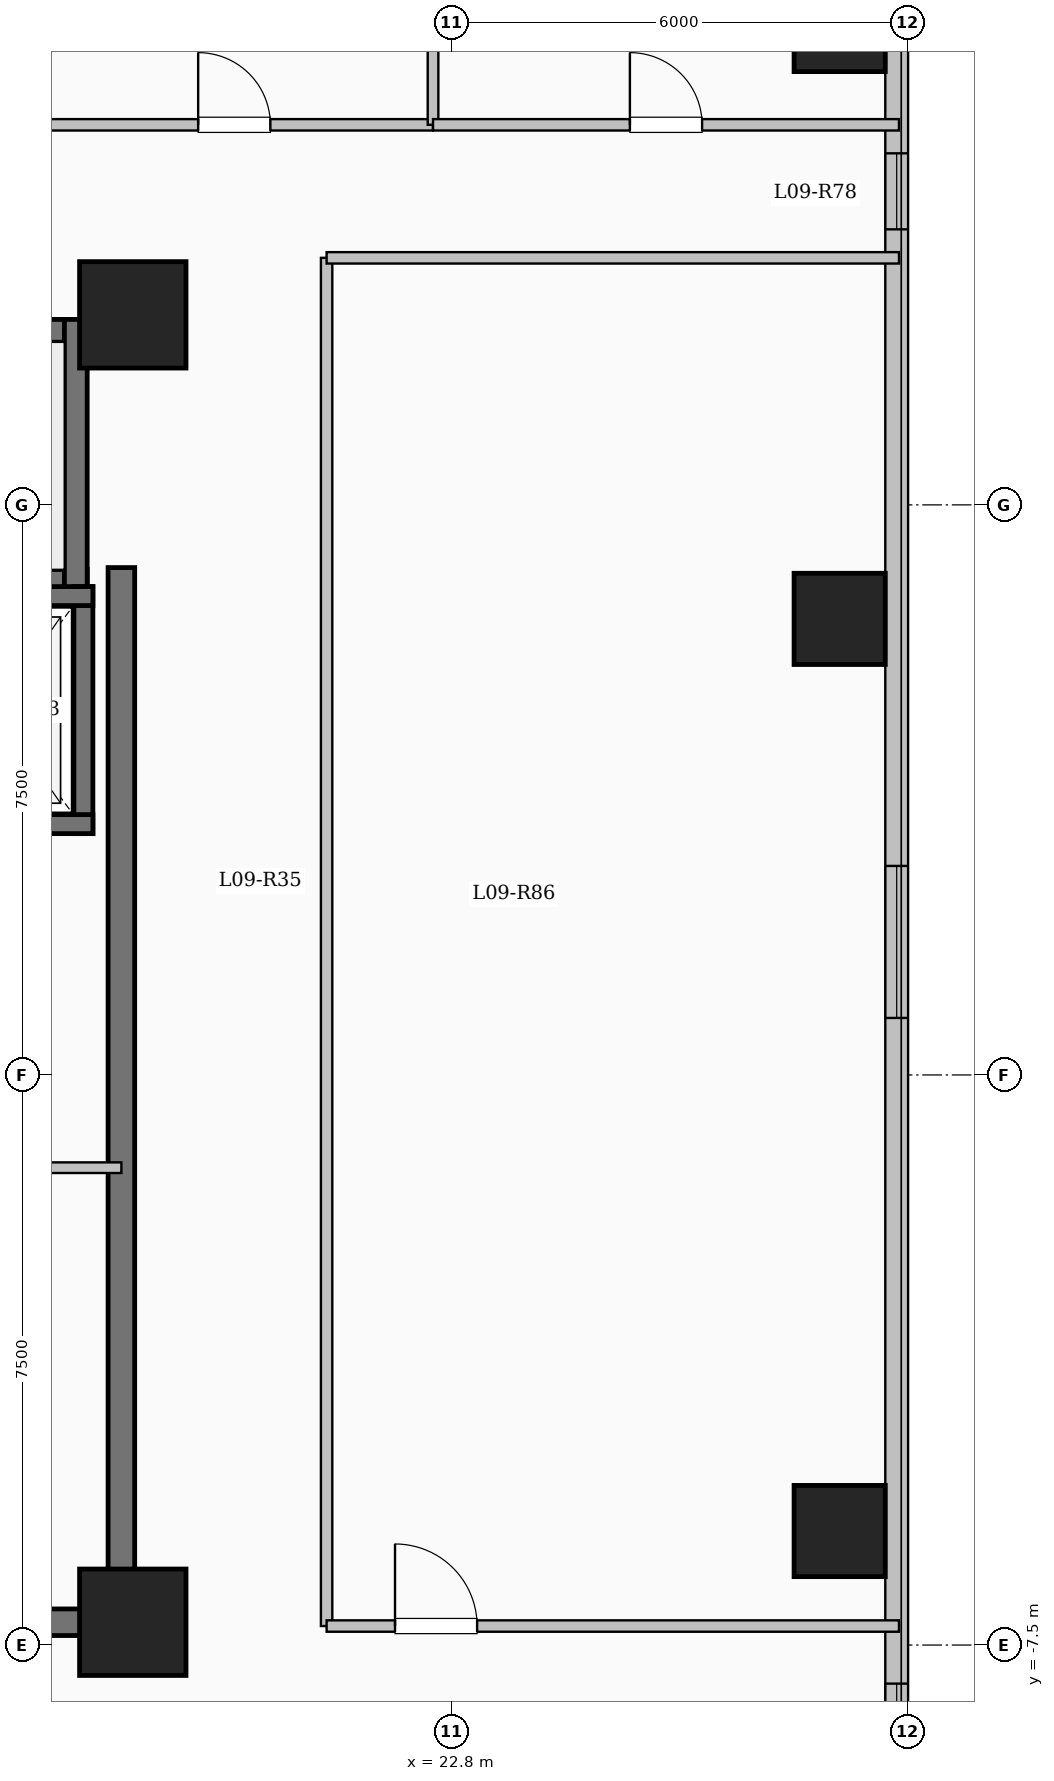
"""IFC4 building model, lengths in metres.
Left out: names, types, materials, properties, quantities, classifications, styles, units other than length and angle.
Written with IfcOpenShell. Run it as: python <this file> out.ifc"""

import sys

from ifc_helpers import new_model, si_unit, direction, frame, frame_2d, origin, origin_2d, place, context, subcontext, project, spatial, rectangle, extrude, element, fill, save


model = new_model("IFC4")
c1 = context("Model", 3, precision=1e-05, world=origin(), true_north=direction((0.0, 1.0)))
c2 = subcontext(c1, "Body", "Model", "MODEL_VIEW")
j1 = project(units=[si_unit("LENGTHUNIT", "METRE"), si_unit("PLANEANGLEUNIT", "RADIAN")], contexts=[c1])
p1 = place(None, origin())
s1 = spatial("IfcSite", under=j1, at=p1, CompositionType="ELEMENT")
p2 = place(p1, origin())
s2 = spatial("IfcBuilding", under=s1, at=p2, CompositionType="ELEMENT")
p3 = place(p2, frame((0.0, 0.0, 37.4)))
s3 = spatial("IfcBuildingStorey", under=s2, at=p3, CompositionType="ELEMENT", Elevation=37.4)
for number, where, z_axis, x_axis in (
    (1, (18.6, -7.2, 0.0), (0.0, 0.0, 1.0), (1.0, 0.0, 0.0)),
    (2, (18.6, 10.0, 0.0), (0.0, 0.0, 1.0), (1.0, 0.0, 0.0)),
):
    element("IfcColumn", number, at=place(p3, frame(where, z_axis=z_axis, x_axis=x_axis)), inside=s3, PredefinedType="COLUMN", context=c2, shape_type="SweptSolid", body=[
        extrude(rectangle(XDim=1.4, YDim=1.4, at=origin_2d()), origin(), (0.0, 0.0, 1.0), 3.35),
    ])
for number, where, z_axis, x_axis in (
    (3, (27.9, -6.0, 0.0), (0.0, 0.0, 1.0), (1.0, 0.0, 0.0)),
    (4, (27.9, 6.0, 0.0), (0.0, 0.0, 1.0), (1.0, 0.0, 0.0)),
    (5, (27.9, 13.8, 0.0), (0.0, 0.0, 1.0), (1.0, 0.0, 0.0)),
):
    element("IfcColumn", number, at=place(p3, frame(where, z_axis=z_axis, x_axis=x_axis)), inside=s3, PredefinedType="COLUMN", context=c2, shape_type="SweptSolid", body=[
        extrude(rectangle(XDim=1.2, YDim=1.2, at=origin_2d()), origin(), (0.0, 0.0, 1.0), 3.35),
    ])
p4 = place(p3, frame((28.65, 19.05, 0.0), z_axis=(0.0, 0.0, 1.0), x_axis=(0.0, -1.0, 0.0)))
e6 = element("IfcWall", 6, at=p4, inside=s3, PredefinedType="SOLIDWALL", context=c2, shape_type="SweptSolid", body=[
    extrude(rectangle(XDim=38.1, YDim=0.3, at=frame_2d((19.05, 0.0))), origin(), (0.0, 0.0, 1.0), 3.1),
])
p5 = place(p4, frame((2.275, 0.0, 0.9)))
e7 = element("IfcOpeningElement", 7, at=p5, cuts=e6, PredefinedType="OPENING", context=c2, shape_type="SweptSolid", body=[
    extrude(rectangle(XDim=2.0, YDim=1.7, at=frame_2d((1.0, 0.85))), frame((0.0, 0.16, 0.0), z_axis=(0.0, -1.0, 0.0), x_axis=(1.0, 0.0, 0.0)), (0.0, 0.0, 1.0), 0.32),
])
p6 = place(p4, frame((6.925, 0.0, 0.95)))
e8 = element("IfcOpeningElement", 8, at=p6, cuts=e6, PredefinedType="OPENING", context=c2, shape_type="SweptSolid", body=[
    extrude(rectangle(XDim=1.0, YDim=1.5, at=frame_2d((0.5, 0.75))), frame((0.0, 0.16, 0.0), z_axis=(0.0, -1.0, 0.0), x_axis=(1.0, 0.0, 0.0)), (0.0, 0.0, 1.0), 0.32),
])
p7 = place(p4, frame((16.3, 0.0, 0.9)))
e9 = element("IfcOpeningElement", 9, at=p7, cuts=e6, PredefinedType="OPENING", context=c2, shape_type="SweptSolid", body=[
    extrude(rectangle(XDim=2.0, YDim=1.7, at=frame_2d((1.0, 0.85))), frame((0.0, 0.16, 0.0), z_axis=(0.0, -1.0, 0.0), x_axis=(1.0, 0.0, 0.0)), (0.0, 0.0, 1.0), 0.32),
])
p8 = place(p4, frame((27.058, 0.0, 0.9)))
e10 = element("IfcOpeningElement", 10, at=p8, cuts=e6, PredefinedType="OPENING", context=c2, shape_type="SweptSolid", body=[
    extrude(rectangle(XDim=1.5, YDim=1.65, at=frame_2d((0.75, 0.825))), frame((0.0, 0.16, 0.0), z_axis=(0.0, -1.0, 0.0), x_axis=(1.0, 0.0, 0.0)), (0.0, 0.0, 1.0), 0.32),
])
p9 = place(p4, frame((32.55, 0.0, 0.9)))
e11 = element("IfcOpeningElement", 11, at=p9, cuts=e6, PredefinedType="OPENING", context=c2, shape_type="SweptSolid", body=[
    extrude(rectangle(XDim=2.4, YDim=1.8, at=frame_2d((1.2, 0.9))), frame((0.0, 0.16, 0.0), z_axis=(0.0, -1.0, 0.0), x_axis=(1.0, 0.0, 0.0)), (0.0, 0.0, 1.0), 0.32),
])
p10 = place(p3, frame((10.0, 9.79, 0.0), z_axis=(0.0, 0.0, 1.0), x_axis=(1.0, 0.0, 0.0)))
e12 = element("IfcWall", 12, at=p10, inside=s3, PredefinedType="SHEAR", context=c2, shape_type="SweptSolid", body=[
    extrude(rectangle(XDim=8.0, YDim=0.3, at=frame_2d((4.0, 0.0))), origin(), (0.0, 0.0, 1.0), 3.35),
])
p11 = place(p3, frame((10.0, 6.5, 0.0), z_axis=(0.0, 0.0, 1.0), x_axis=(1.0, 0.0, 0.0)))
e13 = element("IfcWall", 13, at=p11, inside=s3, PredefinedType="SHEAR", context=c2, shape_type="SweptSolid", body=[
    extrude(rectangle(XDim=8.0, YDim=0.3, at=frame_2d((4.0, 0.0))), origin(), (0.0, 0.0, 1.0), 3.35),
])
p12 = place(p11, frame((0.55, 0.0, 0.0)))
e14 = element("IfcOpeningElement", 14, at=p12, cuts=e13, PredefinedType="OPENING", context=c2, shape_type="SweptSolid", body=[
    extrude(rectangle(XDim=1.0, YDim=2.15, at=frame_2d((0.5, 1.075))), frame((0.0, 0.16, 0.0), z_axis=(0.0, -1.0, 0.0), x_axis=(1.0, 0.0, 0.0)), (0.0, 0.0, 1.0), 0.32),
])
p13 = place(p3, frame((17.85, 6.35, 0.0), z_axis=(0.0, 0.0, 1.0), x_axis=(0.0, 1.0, 0.0)))
e15 = element("IfcWall", 15, at=p13, inside=s3, PredefinedType="SHEAR", context=c2, shape_type="SweptSolid", body=[
    extrude(rectangle(XDim=3.59, YDim=0.3, at=frame_2d((1.795, 0.0))), origin(), (0.0, 0.0, 1.0), 3.35),
])
p14 = place(p3, frame((17.95, 3.175, 0.0), z_axis=(0.0, 0.0, 1.0), x_axis=(0.0, 1.0, 0.0)))
e16 = element("IfcWall", 16, at=p14, inside=s3, PredefinedType="SHEAR", context=c2, shape_type="SweptSolid", body=[
    extrude(rectangle(XDim=3.25, YDim=0.25, at=frame_2d((1.625, 0.0))), origin(), (0.0, 0.0, 1.0), 3.35),
])
for number, where, z_axis, x_axis in (
    (17, (15.525, 3.3, 0.0), (0.0, 0.0, 1.0), (1.0, 0.0, 0.0)),
    (18, (15.525, 6.3, 0.0), (0.0, 0.0, 1.0), (1.0, 0.0, 0.0)),
):
    element("IfcWall", number, at=place(p3, frame(where, z_axis=z_axis, x_axis=x_axis)), inside=s3, PredefinedType="SHEAR", context=c2, shape_type="SweptSolid", body=[
        extrude(rectangle(XDim=2.55, YDim=0.25, at=frame_2d((1.275, 0.0))), origin(), (0.0, 0.0, 1.0), 3.35),
    ])
p15 = place(p3, frame((18.45, -7.375, 0.0), z_axis=(0.0, 0.0, 1.0), x_axis=(0.0, 1.0, 0.0)))
e19 = element("IfcWall", 19, at=p15, inside=s3, PredefinedType="SHEAR", context=c2, shape_type="SweptSolid", body=[
    extrude(rectangle(XDim=14.05, YDim=0.35, at=frame_2d((7.025, 0.0))), origin(), (0.0, 0.0, 1.0), 3.35),
])
p16 = place(p3, frame((10.075, -7.2, 0.0), z_axis=(0.0, 0.0, 1.0), x_axis=(1.0, 0.0, 0.0)))
e20 = element("IfcWall", 20, at=p16, inside=s3, PredefinedType="SHEAR", context=c2, shape_type="SweptSolid", body=[
    extrude(rectangle(XDim=8.55, YDim=0.35, at=frame_2d((4.275, 0.0))), origin(), (0.0, 0.0, 1.0), 3.35),
])
p17 = place(p3, frame((15.4, -1.22, 0.0), z_axis=(0.0, 0.0, 1.0), x_axis=(1.0, 0.0, 0.0)))
e21 = element("IfcWall", 21, at=p17, inside=s3, PredefinedType="PARTITIONING", context=c2, shape_type="SweptSolid", body=[
    extrude(rectangle(XDim=3.05, YDim=0.14, at=frame_2d((1.525, 0.0))), origin(), (0.0, 0.0, 1.0), 3.1),
])
p18 = place(p17, frame((1.05, 0.0, 0.0)))
e22 = element("IfcOpeningElement", 22, at=p18, cuts=e21, PredefinedType="OPENING", context=c2, shape_type="SweptSolid", body=[
    extrude(rectangle(XDim=0.9, YDim=2.08, at=frame_2d((0.45, 1.04))), frame((0.0, 0.08, 0.0), z_axis=(0.0, -1.0, 0.0), x_axis=(1.0, 0.0, 0.0)), (0.0, 0.0, 1.0), 0.16),
])
p19 = place(p3, frame((3.85, 12.5, 0.0), z_axis=(0.0, 0.0, 1.0), x_axis=(1.0, 0.0, 0.0)))
e23 = element("IfcWall", 23, at=p19, inside=s3, PredefinedType="PARTITIONING", context=c2, shape_type="SweptSolid", body=[
    extrude(rectangle(XDim=18.7, YDim=0.15, at=frame_2d((9.35, 0.0))), origin(), (0.0, 0.0, 1.0), 3.1),
])
p20 = place(p19, frame((2.942, 0.0, 0.0)))
e24 = element("IfcOpeningElement", 24, at=p20, cuts=e23, PredefinedType="OPENING", context=c2, shape_type="SweptSolid", body=[
    extrude(rectangle(XDim=0.95, YDim=2.15, at=frame_2d((0.475, 1.075))), frame((0.0, 0.085, 0.0), z_axis=(0.0, -1.0, 0.0), x_axis=(1.0, 0.0, 0.0)), (0.0, 0.0, 1.0), 0.17),
])
p21 = place(p19, frame((9.647, 0.0, 0.0)))
e25 = element("IfcOpeningElement", 25, at=p21, cuts=e23, PredefinedType="OPENING", context=c2, shape_type="SweptSolid", body=[
    extrude(rectangle(XDim=0.95, YDim=2.15, at=frame_2d((0.475, 1.075))), frame((0.0, 0.085, 0.0), z_axis=(0.0, -1.0, 0.0), x_axis=(1.0, 0.0, 0.0)), (0.0, 0.0, 1.0), 0.17),
])
p22 = place(p19, frame((15.61, 0.0, 0.0)))
e26 = element("IfcOpeningElement", 26, at=p22, cuts=e23, PredefinedType="OPENING", context=c2, shape_type="SweptSolid", body=[
    extrude(rectangle(XDim=0.95, YDim=2.15, at=frame_2d((0.475, 1.075))), frame((0.0, 0.085, 0.0), z_axis=(0.0, -1.0, 0.0), x_axis=(1.0, 0.0, 0.0)), (0.0, 0.0, 1.0), 0.17),
])
p23 = place(p3, frame((21.15, -7.25, 0.0), z_axis=(0.0, 0.0, 1.0), x_axis=(0.0, 1.0, 0.0)))
e27 = element("IfcWall", 27, at=p23, inside=s3, PredefinedType="PARTITIONING", context=c2, shape_type="SweptSolid", body=[
    extrude(rectangle(XDim=18.0, YDim=0.15, at=frame_2d((9.0, 0.0))), origin(), (0.0, 0.0, 1.0), 2.585),
])
p24 = place(p3, frame((21.15, -7.25, 0.0), z_axis=(0.0, 0.0, 1.0), x_axis=(1.0, 0.0, 0.0)))
e28 = element("IfcWall", 28, at=p24, inside=s3, PredefinedType="PARTITIONING", context=c2, shape_type="SweptSolid", body=[
    extrude(rectangle(XDim=7.53, YDim=0.15, at=frame_2d((3.765, 0.0))), origin(), (0.0, 0.0, 1.0), 3.1),
])
p25 = place(p24, frame((0.9, 0.0, 0.0)))
e29 = element("IfcOpeningElement", 29, at=p25, cuts=e28, PredefinedType="OPENING", context=c2, shape_type="SweptSolid", body=[
    extrude(rectangle(XDim=1.08, YDim=2.15, at=frame_2d((0.54, 1.075))), frame((0.0, 0.085, 0.0), z_axis=(0.0, -1.0, 0.0), x_axis=(1.0, 0.0, 0.0)), (0.0, 0.0, 1.0), 0.17),
])
p26 = place(p3, frame((21.15, 10.75, 0.0), z_axis=(0.0, 0.0, 1.0), x_axis=(1.0, 0.0, 0.0)))
e30 = element("IfcWall", 30, at=p26, inside=s3, PredefinedType="PARTITIONING", context=c2, shape_type="SweptSolid", body=[
    extrude(rectangle(XDim=7.53, YDim=0.15, at=frame_2d((3.765, 0.0))), origin(), (0.0, 0.0, 1.0), 3.1),
])
p27 = place(p3, frame((22.55, 12.5, 0.0), z_axis=(0.0, 0.0, 1.0), x_axis=(0.0, 1.0, 0.0)))
e31 = element("IfcWall", 31, at=p27, inside=s3, PredefinedType="PARTITIONING", context=c2, shape_type="SweptSolid", body=[
    extrude(rectangle(XDim=6.55, YDim=0.14, at=frame_2d((3.275, 0.0))), origin(), (0.0, 0.0, 1.0), 3.1),
])
p28 = place(p3, frame((22.55, 12.5, 0.0), z_axis=(0.0, 0.0, 1.0), x_axis=(1.0, 0.0, 0.0)))
e32 = element("IfcWall", 32, at=p28, inside=s3, PredefinedType="PARTITIONING", context=c2, shape_type="SweptSolid", body=[
    extrude(rectangle(XDim=6.13, YDim=0.15, at=frame_2d((3.065, 0.0))), origin(), (0.0, 0.0, 1.0), 3.1),
])
p29 = place(p28, frame((2.59, 0.0, 0.0)))
e33 = element("IfcOpeningElement", 33, at=p29, cuts=e32, PredefinedType="OPENING", context=c2, shape_type="SweptSolid", body=[
    extrude(rectangle(XDim=0.95, YDim=2.15, at=frame_2d((0.475, 1.075))), frame((0.0, 0.085, 0.0), z_axis=(0.0, -1.0, 0.0), x_axis=(1.0, 0.0, 0.0)), (0.0, 0.0, 1.0), 0.17),
])
p30 = place(p6, origin())
e34 = element("IfcWindow", 34, at=p30, inside=s3, PartitioningType="SINGLE_PANEL", PredefinedType="WINDOW", context=c2, shape_type="SweptSolid", body=[
    extrude(rectangle(XDim=1.0, YDim=1.5, at=frame_2d((0.5, 0.75))), frame((0.0, 0.03, 0.0), z_axis=(0.0, -1.0, 0.0), x_axis=(1.0, 0.0, 0.0)), (0.0, 0.0, 1.0), 0.06),
])
fill(e8, e34)
p31 = place(p7, origin())
e35 = element("IfcWindow", 35, at=p31, inside=s3, PartitioningType="SINGLE_PANEL", PredefinedType="WINDOW", context=c2, shape_type="SweptSolid", body=[
    extrude(rectangle(XDim=2.0, YDim=1.7, at=frame_2d((1.0, 0.85))), frame((0.0, 0.03, 0.0), z_axis=(0.0, -1.0, 0.0), x_axis=(1.0, 0.0, 0.0)), (0.0, 0.0, 1.0), 0.06),
])
fill(e9, e35)
p32 = place(p8, origin())
e36 = element("IfcWindow", 36, at=p32, inside=s3, PartitioningType="SINGLE_PANEL", PredefinedType="WINDOW", context=c2, shape_type="SweptSolid", body=[
    extrude(rectangle(XDim=1.5, YDim=1.65, at=frame_2d((0.75, 0.825))), frame((0.0, 0.03, 0.0), z_axis=(0.0, -1.0, 0.0), x_axis=(1.0, 0.0, 0.0)), (0.0, 0.0, 1.0), 0.06),
])
fill(e10, e36)
p33 = place(p22, origin())
e37 = element("IfcDoor", 37, at=p33, inside=s3, OperationType="SINGLE_SWING_LEFT", PredefinedType="DOOR", context=c2, shape_type="SweptSolid", body=[
    extrude(rectangle(XDim=0.95, YDim=2.15, at=frame_2d((0.475, 1.075))), frame((0.0, 0.025, 0.0), z_axis=(0.0, -1.0, 0.0), x_axis=(1.0, 0.0, 0.0)), (0.0, 0.0, 1.0), 0.05),
])
fill(e26, e37)
p34 = place(p29, origin())
e38 = element("IfcDoor", 38, at=p34, inside=s3, OperationType="SINGLE_SWING_LEFT", PredefinedType="DOOR", context=c2, shape_type="SweptSolid", body=[
    extrude(rectangle(XDim=0.95, YDim=2.15, at=frame_2d((0.475, 1.075))), frame((0.0, 0.025, 0.0), z_axis=(0.0, -1.0, 0.0), x_axis=(1.0, 0.0, 0.0)), (0.0, 0.0, 1.0), 0.05),
])
fill(e33, e38)
p35 = place(p25, origin())
e39 = element("IfcDoor", 39, at=p35, inside=s3, OperationType="SINGLE_SWING_LEFT", PredefinedType="DOOR", context=c2, shape_type="SweptSolid", body=[
    extrude(rectangle(XDim=1.08, YDim=2.15, at=frame_2d((0.54, 1.075))), frame((0.0, 0.025, 0.0), z_axis=(0.0, -1.0, 0.0), x_axis=(1.0, 0.0, 0.0)), (0.0, 0.0, 1.0), 0.05),
])
fill(e29, e39)
save(model, sys.argv[1])
